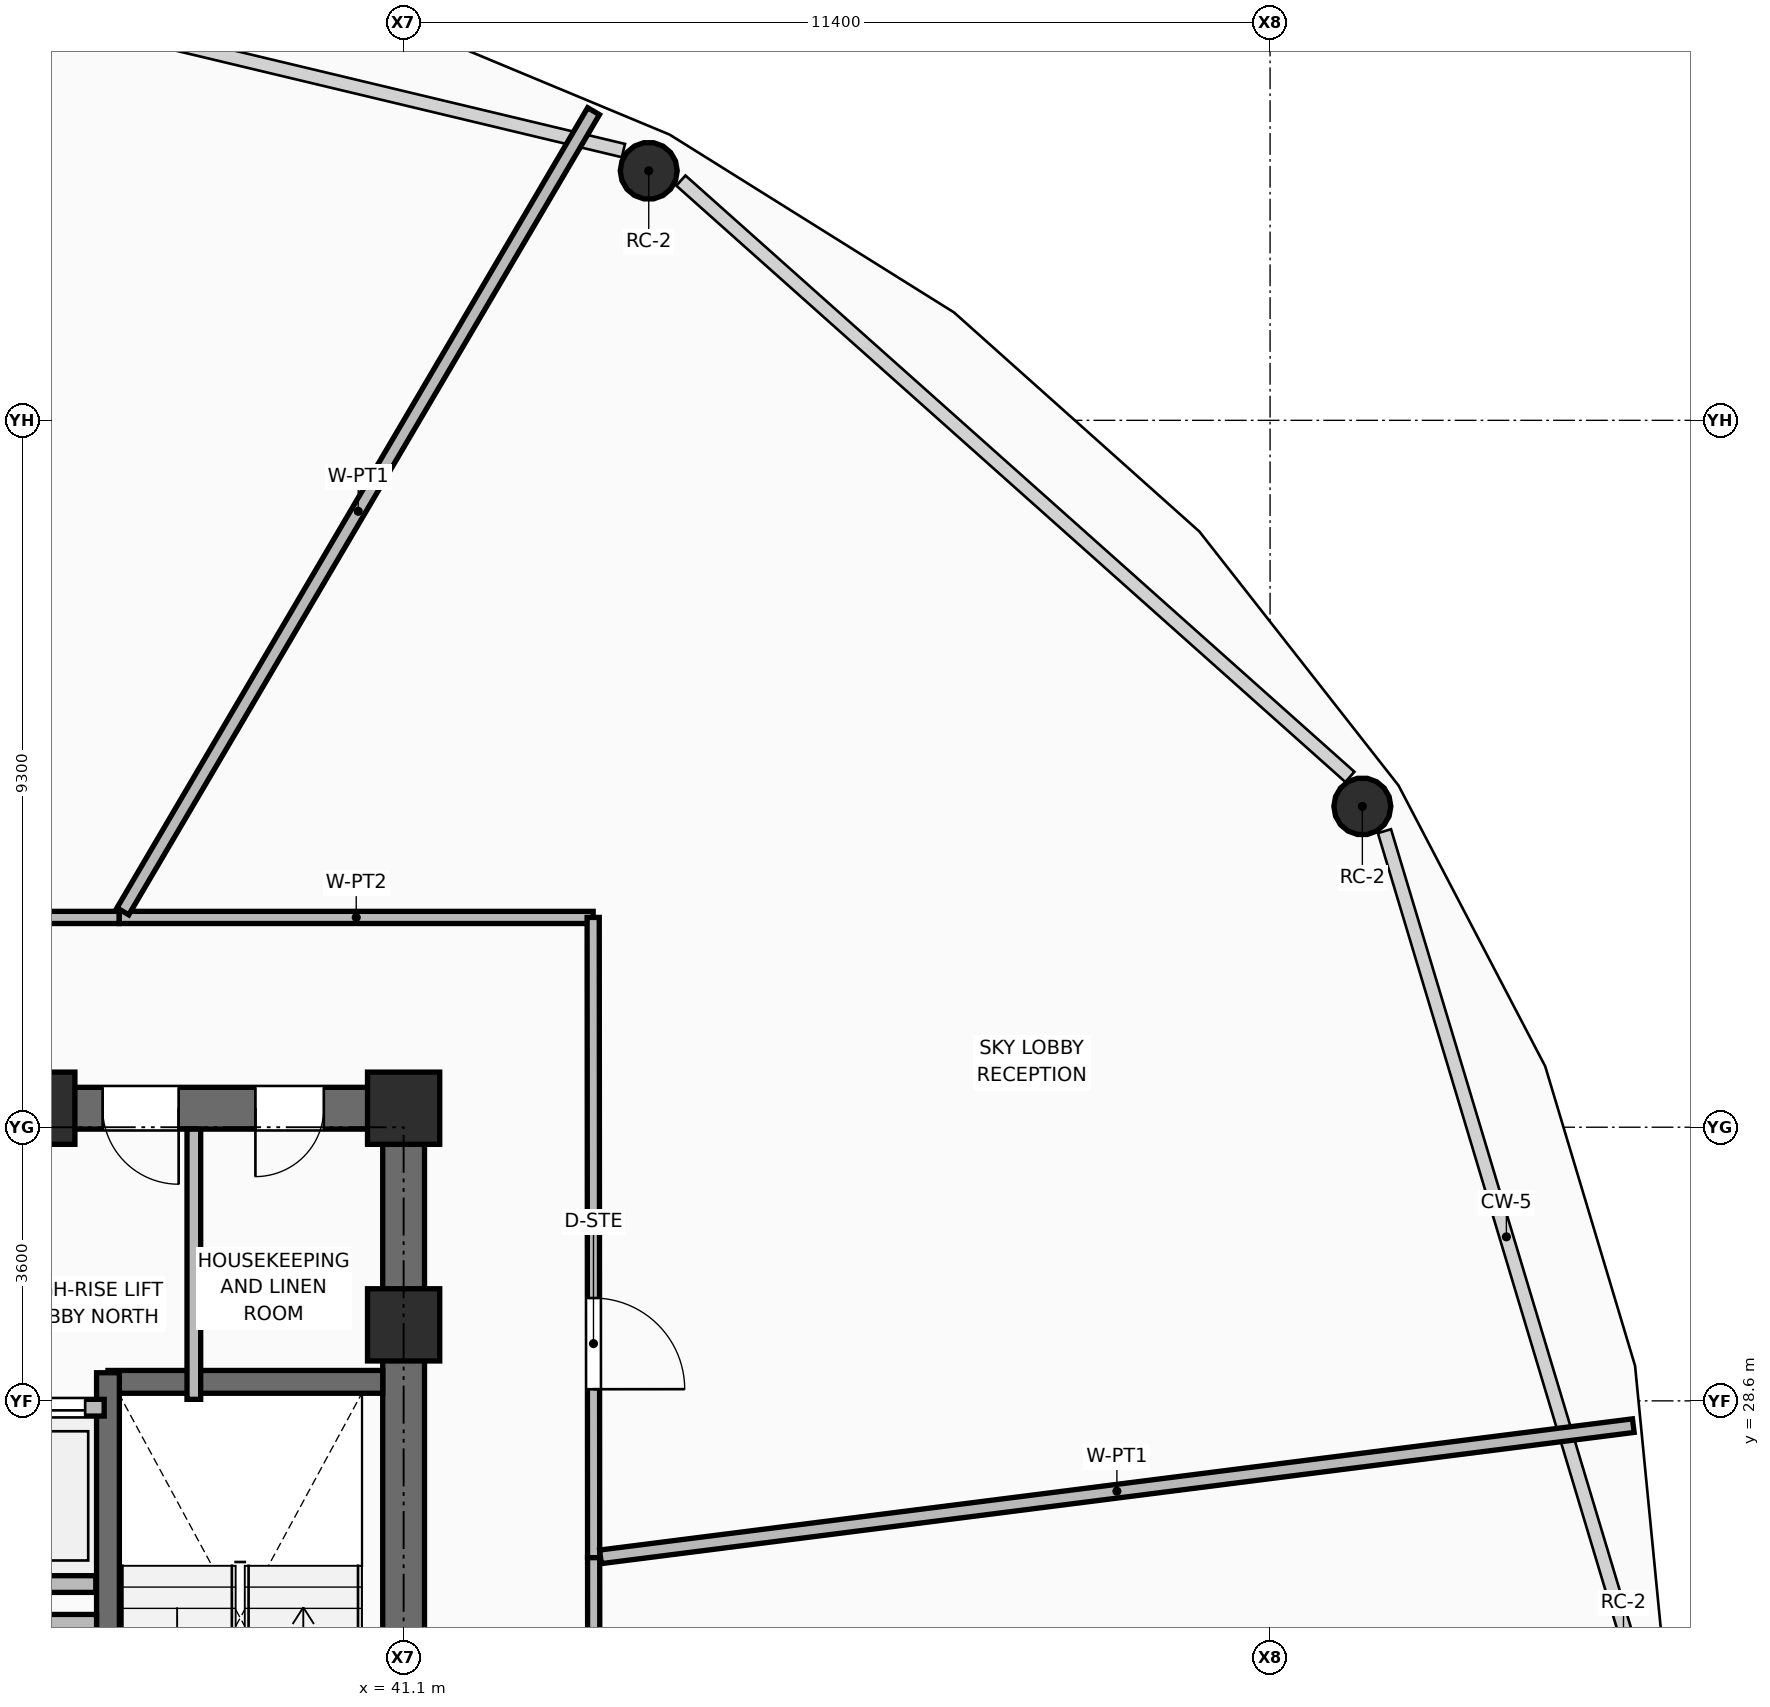
"""IFC4 building model, lengths in metres.
Left out: names, types, materials, properties, quantities, classifications, styles, units other than length and angle.
Written with IfcOpenShell. Run it as: python <this file> out.ifc"""

import sys

from ifc_helpers import new_model, si_unit, direction, frame, frame_2d, origin, origin_2d, place, context, subcontext, project, spatial, rectangle, hollow_circle, extrude, element, fill, save


model = new_model("IFC4")
c1 = context("Model", 3, precision=1e-05, world=origin(), true_north=direction((0.0, 1.0)))
c2 = subcontext(c1, "Body", "Model", "MODEL_VIEW")
j1 = project(units=[si_unit("LENGTHUNIT", "METRE"), si_unit("PLANEANGLEUNIT", "RADIAN")], contexts=[c1])
p1 = place(None, origin())
s1 = spatial("IfcSite", under=j1, at=p1, CompositionType="ELEMENT")
p2 = place(p1, origin())
s2 = spatial("IfcBuilding", under=s1, at=p2, CompositionType="ELEMENT")
p3 = place(p2, frame((0.0, 0.0, 96.15)))
s3 = spatial("IfcBuildingStorey", under=s2, at=p3, CompositionType="ELEMENT", Elevation=96.15)
for number, where, z_axis, x_axis in (
    (1, (41.1, 29.6, 0.0), (0.0, 0.0, 1.0), (1.0, 0.0, 0.0)),
    (2, (36.3, 32.45, 0.0), (0.0, 0.0, 1.0), (1.0, 0.0, 0.0)),
    (3, (41.1, 32.45, 0.0), (0.0, 0.0, 1.0), (1.0, 0.0, 0.0)),
):
    element("IfcColumn", number, at=place(p3, frame(where, z_axis=z_axis, x_axis=x_axis)), inside=s3, PredefinedType="COLUMN", context=c2, shape_type="SweptSolid", body=[
        extrude(rectangle(XDim=0.95, YDim=0.95, at=origin_2d()), origin(), (0.0, 0.0, 1.0), 4.8),
    ])
p4 = place(p3, frame((53.714, 36.421, 0.0), z_axis=(-0.011730129795, -0.005812226475, 0.999914307368), x_axis=(0.4439817233, -0.896035841569, 0.0)))
e4 = element("IfcColumn", 4, at=p4, inside=s3, PredefinedType="COLUMN", context=c2, shape_type="SweptSolid", body=[
    extrude(hollow_circle(Radius=0.375, WallThickness=0.035, at=origin_2d()), origin(), (0.0, 0.0, 1.0), 4.621),
])
p5 = place(p3, frame((44.325, 44.783, 0.0), z_axis=(-0.006710543723, -0.010356429682, 0.999923853584), x_axis=(0.839225358586, -0.543783778267, 0.0)))
e5 = element("IfcColumn", 5, at=p5, inside=s3, PredefinedType="COLUMN", context=c2, shape_type="SweptSolid", body=[
    extrude(hollow_circle(Radius=0.375, WallThickness=0.035, at=origin_2d()), origin(), (0.0, 0.0, 1.0), 4.62),
])
p6 = place(p3, frame((34.91, 26.19, 0.0), z_axis=(0.0, 0.0, 1.0), x_axis=(1.0, 0.0, 0.0)))
e6 = element("IfcWall", 6, at=p6, inside=s3, PredefinedType="PARTITIONING", context=c2, shape_type="SweptSolid", body=[
    extrude(rectangle(XDim=2.14, YDim=0.22, at=frame_2d((1.07, 0.0))), origin(), (0.0, 0.0, 1.0), 4.595),
])
p7 = place(p3, frame((21.625, 32.45, 0.0), z_axis=(0.0, 0.0, 1.0), x_axis=(1.0, 0.0, 0.0)))
e7 = element("IfcWall", 7, at=p7, inside=s3, PredefinedType="SHEAR", context=c2, shape_type="SweptSolid", body=[
    extrude(rectangle(XDim=19.75, YDim=0.55, at=frame_2d((9.875, 0.0))), origin(), (0.0, 0.0, 1.0), 4.62),
])
p8 = place(p7, frame((2.125, 0.0, 0.0)))
e8 = element("IfcOpeningElement", 8, at=p8, cuts=e7, PredefinedType="OPENING", context=c2, shape_type="SweptSolid", body=[
    extrude(rectangle(XDim=1.1, YDim=2.1, at=frame_2d((0.55, 1.05))), frame((0.0, 0.285, 0.0), z_axis=(0.0, -1.0, 0.0), x_axis=(1.0, 0.0, 0.0)), (0.0, 0.0, 1.0), 0.57),
])
p9 = place(p7, frame((15.515, 0.0, 0.0)))
e9 = element("IfcOpeningElement", 9, at=p9, cuts=e7, PredefinedType="OPENING", context=c2, shape_type="SweptSolid", body=[
    extrude(rectangle(XDim=1.0, YDim=2.1, at=frame_2d((0.5, 1.05))), frame((0.0, 0.285, 0.0), z_axis=(0.0, -1.0, 0.0), x_axis=(1.0, 0.0, 0.0)), (0.0, 0.0, 1.0), 0.57),
])
p10 = place(p7, frame((17.525, 0.0, 0.0)))
e10 = element("IfcOpeningElement", 10, at=p10, cuts=e7, PredefinedType="OPENING", context=c2, shape_type="SweptSolid", body=[
    extrude(rectangle(XDim=0.9, YDim=2.1, at=frame_2d((0.45, 1.05))), frame((0.0, 0.285, 0.0), z_axis=(0.0, -1.0, 0.0), x_axis=(1.0, 0.0, 0.0)), (0.0, 0.0, 1.0), 0.57),
])
p11 = place(p3, frame((41.1, 18.075, 0.0), z_axis=(0.0, 0.0, 1.0), x_axis=(0.0, 1.0, 0.0)))
e11 = element("IfcWall", 11, at=p11, inside=s3, PredefinedType="SHEAR", context=c2, shape_type="SweptSolid", body=[
    extrude(rectangle(XDim=14.1, YDim=0.55, at=frame_2d((7.05, 0.0))), origin(), (0.0, 0.0, 1.0), 4.62),
])
p12 = place(p11, frame((3.385, 0.0, 0.0)))
e12 = element("IfcOpeningElement", 12, at=p12, cuts=e11, PredefinedType="OPENING", context=c2, shape_type="SweptSolid", body=[
    extrude(rectangle(XDim=1.05, YDim=2.1, at=frame_2d((0.525, 1.05))), frame((0.0, 0.285, 0.0), z_axis=(0.0, -1.0, 0.0), x_axis=(1.0, 0.0, 0.0)), (0.0, 0.0, 1.0), 0.57),
])
p13 = place(p3, frame((37.21, 28.85, 0.0), z_axis=(0.0, 0.0, 1.0), x_axis=(1.0, 0.0, 0.0)))
e13 = element("IfcWall", 13, at=p13, inside=s3, PredefinedType="SHEAR", context=c2, shape_type="SweptSolid", body=[
    extrude(rectangle(XDim=3.615, YDim=0.3, at=frame_2d((1.808, 0.0))), origin(), (0.0, 0.0, 1.0), 4.62),
])
p14 = place(p3, frame((37.21, 20.98, 0.0), z_axis=(0.0, 0.0, 1.0), x_axis=(0.0, 1.0, 0.0)))
e14 = element("IfcWall", 14, at=p14, inside=s3, PredefinedType="SHEAR", context=c2, shape_type="SweptSolid", body=[
    extrude(rectangle(XDim=7.99, YDim=0.3, at=frame_2d((3.995, 0.0))), origin(), (0.0, 0.0, 1.0), 4.62),
])
p15 = place(p3, frame((35.56, 28.51, 0.0), z_axis=(0.0, 0.0, 1.0), x_axis=(1.0, 0.0, 0.0)))
e15 = element("IfcWall", 15, at=p15, inside=s3, PredefinedType="PARTITIONING", context=c2, shape_type="SweptSolid", body=[
    extrude(rectangle(XDim=1.6, YDim=0.22, at=frame_2d((0.8, 0.0))), origin(), (0.0, 0.0, 1.0), 4.6),
])
p16 = place(p15, frame((0.25, 0.0, 0.0)))
e16 = element("IfcOpeningElement", 16, at=p16, cuts=e15, PredefinedType="OPENING", context=c2, shape_type="SweptSolid", body=[
    extrude(rectangle(XDim=1.1, YDim=2.2, at=frame_2d((0.55, 1.1))), frame((0.0, 0.12, 0.0), z_axis=(0.0, -1.0, 0.0), x_axis=(1.0, 0.0, 0.0)), (0.0, 0.0, 1.0), 0.24),
])
p17 = place(p3, frame((35.12, 25.68, 0.0), z_axis=(0.0, 0.0, 1.0), x_axis=(1.0, 0.0, 0.0)))
e17 = element("IfcWall", 17, at=p17, inside=s3, PredefinedType="PARTITIONING", context=c2, shape_type="SweptSolid", body=[
    extrude(rectangle(XDim=1.94, YDim=0.22, at=frame_2d((0.97, 0.0))), origin(), (0.0, 0.0, 1.0), 4.6),
])
p18 = place(p3, frame((38.34, 28.62, 0.0), z_axis=(0.0, 0.0, 1.0), x_axis=(0.0, 1.0, 0.0)))
e18 = element("IfcWall", 18, at=p18, inside=s3, PredefinedType="PARTITIONING", context=c2, shape_type="SweptSolid", body=[
    extrude(rectangle(XDim=3.555, YDim=0.18, at=frame_2d((1.777, 0.0))), origin(), (0.0, 0.0, 1.0), 4.6),
])
p19 = place(p3, frame((24.614, 34.96, 0.0), z_axis=(0.0, 0.0, 1.0), x_axis=(1.0, 0.0, 0.0)))
e19 = element("IfcWall", 19, at=p19, inside=s3, PredefinedType="PARTITIONING", context=c2, shape_type="SweptSolid", body=[
    extrude(rectangle(XDim=12.745, YDim=0.16, at=frame_2d((6.373, 0.0))), origin(), (0.0, 0.0, 1.0), 4.056),
])
p20 = place(p19, frame((5.847, 0.0, 0.0)))
e20 = element("IfcOpeningElement", 20, at=p20, cuts=e19, PredefinedType="OPENING", context=c2, shape_type="SweptSolid", body=[
    extrude(rectangle(XDim=1.2, YDim=2.1, at=frame_2d((0.6, 1.05))), frame((0.0, 0.09, 0.0), z_axis=(0.0, -1.0, 0.0), x_axis=(1.0, 0.0, 0.0)), (0.0, 0.0, 1.0), 0.18),
])
p21 = place(p3, frame((37.359, 34.96, 0.0), z_axis=(0.0, 0.0, 1.0), x_axis=(1.0, 0.0, 0.0)))
e21 = element("IfcWall", 21, at=p21, inside=s3, PredefinedType="PARTITIONING", context=c2, shape_type="SweptSolid", body=[
    extrude(rectangle(XDim=6.235, YDim=0.16, at=frame_2d((3.118, 0.0))), origin(), (0.0, 0.0, 1.0), 4.056),
])
p22 = place(p3, frame((43.594, 34.96, 0.0), z_axis=(0.0, 0.0, 1.0), x_axis=(0.000724637491, -0.99999973745, 0.0)))
e22 = element("IfcWall", 22, at=p22, inside=s3, PredefinedType="PARTITIONING", context=c2, shape_type="SweptSolid", body=[
    extrude(rectangle(XDim=8.423, YDim=0.16, at=frame_2d((4.211, 0.0))), origin(), (0.0, 0.0, 1.0), 4.056),
])
p23 = place(p22, frame((5.007, 0.0, 0.0)))
e23 = element("IfcOpeningElement", 23, at=p23, cuts=e22, PredefinedType="OPENING", context=c2, shape_type="SweptSolid", body=[
    extrude(rectangle(XDim=1.2, YDim=2.1, at=frame_2d((0.6, 1.05))), frame((0.0, 0.09, 0.0), z_axis=(0.0, -1.0, 0.0), x_axis=(1.0, 0.0, 0.0)), (0.0, 0.0, 1.0), 0.18),
])
p24 = place(p3, frame((43.6, 26.537, 0.0), z_axis=(0.0, 0.0, 1.0), x_axis=(0.000707776519, -0.999999749526, 0.0)))
e24 = element("IfcWall", 24, at=p24, inside=s3, PredefinedType="PARTITIONING", context=c2, shape_type="SweptSolid", body=[
    extrude(rectangle(XDim=5.519, YDim=0.16, at=frame_2d((2.76, 0.0))), origin(), (0.0, 0.0, 1.0), 4.056),
])
p25 = place(p24, frame((2.26, 0.0, 0.0)))
e25 = element("IfcOpeningElement", 25, at=p25, cuts=e24, PredefinedType="OPENING", context=c2, shape_type="SweptSolid", body=[
    extrude(rectangle(XDim=1.0, YDim=2.1, at=frame_2d((0.5, 1.05))), frame((0.0, 0.09, 0.0), z_axis=(0.0, -1.0, 0.0), x_axis=(1.0, 0.0, 0.0)), (0.0, 0.0, 1.0), 0.18),
])
p26 = place(p3, frame((43.69, 26.548, 0.0), z_axis=(0.0, 0.0, 1.0), x_axis=(0.992031643209, 0.125988963293, 0.0)))
e26 = element("IfcWall", 26, at=p26, inside=s3, PredefinedType="PARTITIONING", context=c2, shape_type="SweptSolid", body=[
    extrude(rectangle(XDim=13.698, YDim=0.18, at=frame_2d((6.849, 0.0))), origin(), (0.0, 0.0, 1.0), 3.901),
])
p27 = place(p3, frame((37.406, 35.04, 0.0), z_axis=(0.0, 0.0, 1.0), x_axis=(0.507071666506, 0.86190389547, 0.0)))
e27 = element("IfcWall", 27, at=p27, inside=s3, PredefinedType="PARTITIONING", context=c2, shape_type="SweptSolid", body=[
    extrude(rectangle(XDim=12.213, YDim=0.18, at=frame_2d((6.107, 0.0))), origin(), (0.0, 0.0, 1.0), 3.901),
])
p28 = place(p16, origin())
e28 = element("IfcDoor", 28, at=p28, inside=s3, OperationType="DOUBLE_DOOR_SLIDING", PredefinedType="DOOR", context=c2, shape_type="SweptSolid", body=[
    extrude(rectangle(XDim=1.1, YDim=2.2, at=frame_2d((0.55, 1.1))), frame((0.0, 0.025, 0.0), z_axis=(0.0, -1.0, 0.0), x_axis=(1.0, 0.0, 0.0)), (0.0, 0.0, 1.0), 0.05),
])
fill(e16, e28)
p29 = place(p9, frame((1.0, 0.0, 0.0), z_axis=(0.0, 0.0, 1.0), x_axis=(-1.0, 0.0, 0.0)))
e29 = element("IfcDoor", 29, at=p29, inside=s3, OperationType="SINGLE_SWING_LEFT", PredefinedType="DOOR", context=c2, shape_type="SweptSolid", body=[
    extrude(rectangle(XDim=1.0, YDim=2.1, at=frame_2d((0.5, 1.05))), frame((0.0, 0.025, 0.0), z_axis=(0.0, -1.0, 0.0), x_axis=(1.0, 0.0, 0.0)), (0.0, 0.0, 1.0), 0.05),
])
fill(e9, e29)
p30 = place(p10, frame((0.9, 0.0, 0.0), z_axis=(0.0, 0.0, 1.0), x_axis=(-1.0, 0.0, 0.0)))
e30 = element("IfcDoor", 30, at=p30, inside=s3, OperationType="SINGLE_SWING_RIGHT", PredefinedType="DOOR", context=c2, shape_type="SweptSolid", body=[
    extrude(rectangle(XDim=0.9, YDim=2.1, at=frame_2d((0.45, 1.05))), frame((0.0, 0.025, 0.0), z_axis=(0.0, -1.0, 0.0), x_axis=(1.0, 0.0, 0.0)), (0.0, 0.0, 1.0), 0.05),
])
fill(e10, e30)
p31 = place(p23, origin())
e31 = element("IfcDoor", 31, at=p31, inside=s3, OperationType="SINGLE_SWING_RIGHT", PredefinedType="DOOR", context=c2, shape_type="SweptSolid", body=[
    extrude(rectangle(XDim=1.2, YDim=2.1, at=frame_2d((0.6, 1.05))), frame((0.0, 0.025, 0.0), z_axis=(0.0, -1.0, 0.0), x_axis=(1.0, 0.0, 0.0)), (0.0, 0.0, 1.0), 0.05),
])
fill(e23, e31)
save(model, sys.argv[1])
